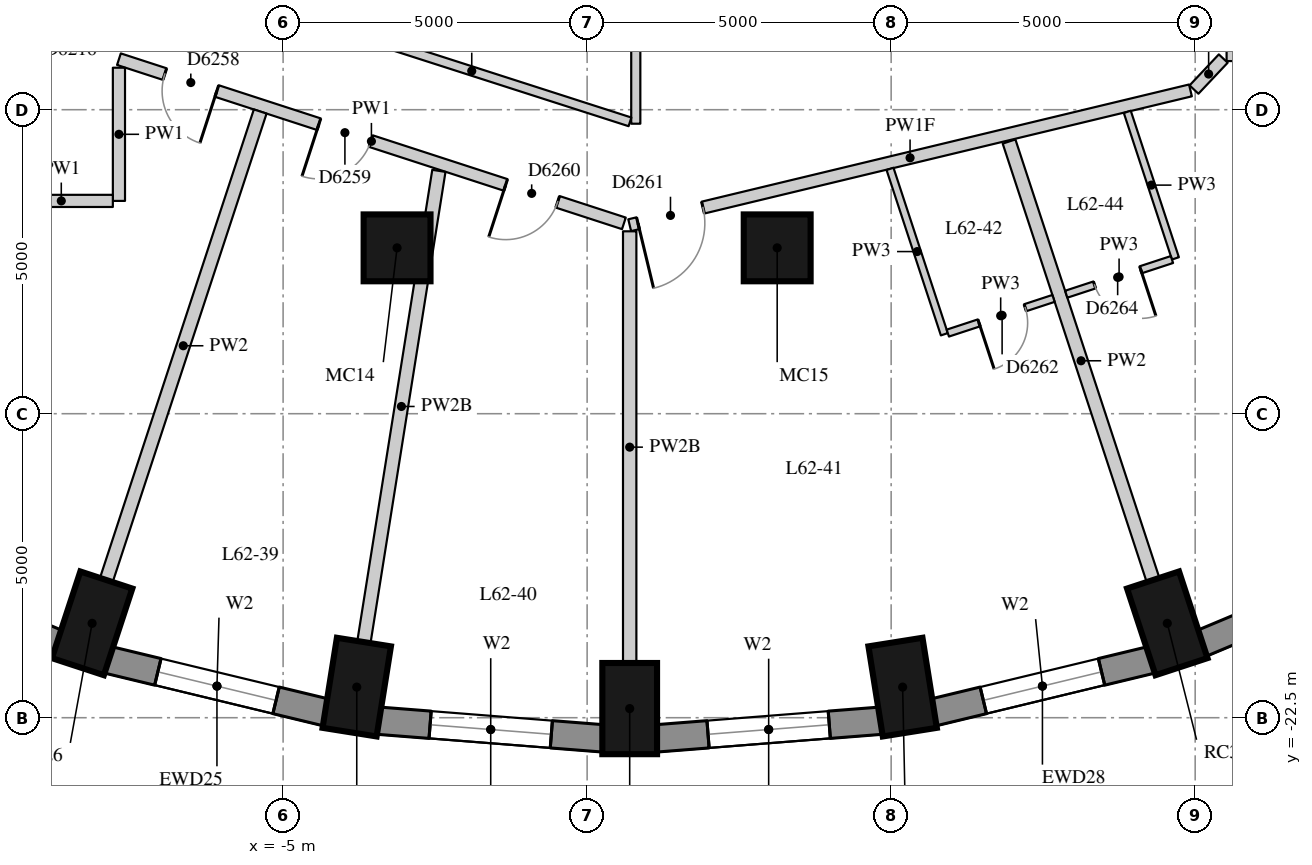
"""IFC4 building model, lengths in metres.
Left out: names, types, materials, properties, quantities, classifications, styles, units other than length and angle.
Written with IfcOpenShell. Run it as: python <this file> out.ifc"""

import sys

from ifc_helpers import new_model, si_unit, direction, frame, frame_2d, origin, origin_2d, place, context, subcontext, project, spatial, rectangle, extrude, element, fill, save


model = new_model("IFC4")
c1 = context("Model", 3, precision=1e-05, world=origin(), true_north=direction((0.0, 1.0)))
c2 = subcontext(c1, "Body", "Model", "MODEL_VIEW")
j1 = project(units=[si_unit("LENGTHUNIT", "METRE"), si_unit("PLANEANGLEUNIT", "RADIAN")], contexts=[c1])
p1 = place(None, origin())
s1 = spatial("IfcSite", under=j1, at=p1, CompositionType="ELEMENT")
p2 = place(p1, origin())
s2 = spatial("IfcBuilding", under=s1, at=p2, CompositionType="ELEMENT")
p3 = place(p2, frame((0.0, 0.0, 218.9)))
s3 = spatial("IfcBuildingStorey", under=s2, at=p3, CompositionType="ELEMENT", Elevation=218.9)
for number, where, z_axis, x_axis in (
    (1, (-8.141, -20.948, 0.0), (0.0, 0.0, 1.0), (-0.312, -0.95, 0.0)),
    (2, (-3.789, -21.997, 0.0), (0.0, 0.0, 1.0), (-0.157, -0.988, 0.0)),
    (3, (0.7, -22.35, 0.0), (0.0, 0.0, 1.0), (0.0, -1.0, 0.0)),
    (4, (5.189, -21.997, 0.0), (0.0, 0.0, 1.0), (0.157, -0.988, 0.0)),
    (5, (9.541, -20.948, 0.0), (0.0, 0.0, 1.0), (0.312, -0.95, 0.0)),
):
    element("IfcColumn", number, at=place(p3, frame(where, z_axis=z_axis, x_axis=x_axis)), inside=s3, PredefinedType="COLUMN", context=c2, shape_type="SweptSolid", body=[
        extrude(rectangle(XDim=1.5, YDim=0.9, at=origin_2d()), origin(), (0.0, 0.0, 1.0), 3.3),
    ])
for number, where, z_axis, x_axis in (
    (6, (-3.126, -14.772, 0.0), (0.0, 0.0, 1.0), (1.0, 0.0, 0.0)),
    (7, (3.126, -14.772, 0.0), (0.0, 0.0, 1.0), (1.0, 0.0, 0.0)),
):
    element("IfcColumn", number, at=place(p3, frame(where, z_axis=z_axis, x_axis=x_axis)), inside=s3, PredefinedType="COLUMN", context=c2, shape_type="SweptSolid", body=[
        extrude(rectangle(XDim=1.1, YDim=1.1, at=origin_2d()), origin(), (0.0, 0.0, 1.0), 3.3),
    ])
p4 = place(p3, frame((-12.069, -19.867, 0.0), z_axis=(0.0, 0.0, 1.0), x_axis=(0.922168222612, -0.386789050006, 0.0)))
e8 = element("IfcWall", 8, at=p4, inside=s3, PredefinedType="SOLIDWALL", context=c2, shape_type="SweptSolid", body=[
    extrude(rectangle(XDim=3.651, YDim=0.45, at=frame_2d((1.825, 0.0))), origin(), (0.0, 0.0, 1.0), 3.02),
])
p5 = place(p4, frame((0.825, 0.0, 0.4)))
e9 = element("IfcOpeningElement", 9, at=p5, cuts=e8, PredefinedType="OPENING", context=c2, shape_type="SweptSolid", body=[
    extrude(rectangle(XDim=2.0, YDim=1.75, at=frame_2d((1.0, 0.875))), frame((0.0, 0.235, 0.0), z_axis=(0.0, -1.0, 0.0), x_axis=(1.0, 0.0, 0.0)), (0.0, 0.0, 1.0), 0.47),
])
p6 = place(p3, frame((-7.885, -21.547, 0.0), z_axis=(0.0, 0.0, 1.0), x_axis=(0.9721584944, -0.234324266275, 0.0)))
e10 = element("IfcWall", 10, at=p6, inside=s3, PredefinedType="SOLIDWALL", context=c2, shape_type="SweptSolid", body=[
    extrude(rectangle(XDim=3.698, YDim=0.45, at=frame_2d((1.849, 0.0))), origin(), (0.0, 0.0, 1.0), 3.02),
])
p7 = place(p6, frame((0.849, 0.0, 0.4)))
e11 = element("IfcOpeningElement", 11, at=p7, cuts=e10, PredefinedType="OPENING", context=c2, shape_type="SweptSolid", body=[
    extrude(rectangle(XDim=2.0, YDim=1.75, at=frame_2d((1.0, 0.875))), frame((0.0, 0.235, 0.0), z_axis=(0.0, -1.0, 0.0), x_axis=(1.0, 0.0, 0.0)), (0.0, 0.0, 1.0), 0.47),
])
p8 = place(p3, frame((-3.441, -22.548, 0.0), z_axis=(0.0, 0.0, 1.0), x_axis=(0.996913971077, -0.078501810629, 0.0)))
e12 = element("IfcWall", 12, at=p8, inside=s3, PredefinedType="SOLIDWALL", context=c2, shape_type="SweptSolid", body=[
    extrude(rectangle(XDim=3.723, YDim=0.45, at=frame_2d((1.861, 0.0))), origin(), (0.0, 0.0, 1.0), 3.02),
])
p9 = place(p8, frame((0.861, 0.0, 0.4)))
e13 = element("IfcOpeningElement", 13, at=p9, cuts=e12, PredefinedType="OPENING", context=c2, shape_type="SweptSolid", body=[
    extrude(rectangle(XDim=2.0, YDim=1.75, at=frame_2d((1.0, 0.875))), frame((0.0, 0.235, 0.0), z_axis=(0.0, -1.0, 0.0), x_axis=(1.0, 0.0, 0.0)), (0.0, 0.0, 1.0), 0.47),
])
p10 = place(p3, frame((1.13, -22.841, 0.0), z_axis=(0.0, 0.0, 1.0), x_axis=(0.996913566885, 0.078506943392, 0.0)))
e14 = element("IfcWall", 14, at=p10, inside=s3, PredefinedType="SOLIDWALL", context=c2, shape_type="SweptSolid", body=[
    extrude(rectangle(XDim=3.722, YDim=0.45, at=frame_2d((1.861, 0.0))), origin(), (0.0, 0.0, 1.0), 3.02),
])
p11 = place(p10, frame((0.861, 0.0, 0.4)))
e15 = element("IfcOpeningElement", 15, at=p11, cuts=e14, PredefinedType="OPENING", context=c2, shape_type="SweptSolid", body=[
    extrude(rectangle(XDim=2.0, YDim=1.75, at=frame_2d((1.0, 0.875))), frame((0.0, 0.235, 0.0), z_axis=(0.0, -1.0, 0.0), x_axis=(1.0, 0.0, 0.0)), (0.0, 0.0, 1.0), 0.47),
])
p12 = place(p3, frame((5.691, -22.414, 0.0), z_axis=(0.0, 0.0, 1.0), x_axis=(0.9721584944, 0.234324266275, 0.0)))
e16 = element("IfcWall", 16, at=p12, inside=s3, PredefinedType="SOLIDWALL", context=c2, shape_type="SweptSolid", body=[
    extrude(rectangle(XDim=3.698, YDim=0.45, at=frame_2d((1.849, 0.0))), origin(), (0.0, 0.0, 1.0), 3.02),
])
p13 = place(p12, frame((0.849, 0.0, 0.4)))
e17 = element("IfcOpeningElement", 17, at=p13, cuts=e16, PredefinedType="OPENING", context=c2, shape_type="SweptSolid", body=[
    extrude(rectangle(XDim=2.0, YDim=1.75, at=frame_2d((1.0, 0.875))), frame((0.0, 0.235, 0.0), z_axis=(0.0, -1.0, 0.0), x_axis=(1.0, 0.0, 0.0)), (0.0, 0.0, 1.0), 0.47),
])
p14 = place(p3, frame((10.103, -21.279, 0.0), z_axis=(0.0, 0.0, 1.0), x_axis=(0.922168222612, 0.386789050006, 0.0)))
e18 = element("IfcWall", 18, at=p14, inside=s3, PredefinedType="SOLIDWALL", context=c2, shape_type="SweptSolid", body=[
    extrude(rectangle(XDim=3.651, YDim=0.45, at=frame_2d((1.825, 0.0))), origin(), (0.0, 0.0, 1.0), 3.02),
])
p15 = place(p14, frame((0.825, 0.0, 0.4)))
e19 = element("IfcOpeningElement", 19, at=p15, cuts=e18, PredefinedType="OPENING", context=c2, shape_type="SweptSolid", body=[
    extrude(rectangle(XDim=2.0, YDim=1.75, at=frame_2d((1.0, 0.875))), frame((0.0, 0.235, 0.0), z_axis=(0.0, -1.0, 0.0), x_axis=(1.0, 0.0, 0.0)), (0.0, 0.0, 1.0), 0.47),
])
p16 = place(p3, frame((17.5, -11.6, 0.0), z_axis=(0.0, 0.0, 1.0), x_axis=(-1.0, 0.0, 0.0)))
e20 = element("IfcWall", 20, at=p16, inside=s3, PredefinedType="PARTITIONING", context=c2, shape_type="SweptSolid", body=[
    extrude(rectangle(XDim=6.983, YDim=0.2, at=frame_2d((3.492, 0.0))), origin(), (0.0, 0.0, 1.0), 3.02),
])
p17 = place(p16, frame((5.743, 0.0, 0.0)))
e21 = element("IfcOpeningElement", 21, at=p17, cuts=e20, PredefinedType="OPENING", context=c2, shape_type="SweptSolid", body=[
    extrude(rectangle(XDim=1.1, YDim=2.1, at=frame_2d((0.55, 1.05))), frame((0.0, 0.11, 0.0), z_axis=(0.0, -1.0, 0.0), x_axis=(1.0, 0.0, 0.0)), (0.0, 0.0, 1.0), 0.22),
])
p18 = place(p16, frame((1.208, 0.0, 0.0)))
e22 = element("IfcOpeningElement", 22, at=p18, cuts=e20, PredefinedType="OPENING", context=c2, shape_type="SweptSolid", body=[
    extrude(rectangle(XDim=1.8, YDim=2.1, at=frame_2d((0.9, 1.05))), frame((0.0, 0.11, 0.0), z_axis=(0.0, -1.0, 0.0), x_axis=(1.0, 0.0, 0.0)), (0.0, 0.0, 1.0), 0.22),
])
p19 = place(p3, frame((10.462, -11.659, 0.0), z_axis=(0.0, 0.0, 1.0), x_axis=(-0.686265612426, -0.727351021998, 0.0)))
e23 = element("IfcWall", 23, at=p19, inside=s3, PredefinedType="PARTITIONING", context=c2, shape_type="SweptSolid", body=[
    extrude(rectangle(XDim=0.701, YDim=0.2, at=frame_2d((0.351, 0.0))), origin(), (0.0, 0.0, 1.0), 3.02),
])
p20 = place(p3, frame((9.922, -12.183, 0.0), z_axis=(0.0, 0.0, 1.0), x_axis=(-0.972292362394, -0.233768180104, 0.0)))
e24 = element("IfcWall", 24, at=p20, inside=s3, PredefinedType="PARTITIONING", context=c2, shape_type="SweptSolid", body=[
    extrude(rectangle(XDim=9.485, YDim=0.2, at=frame_2d((4.742, 0.0))), origin(), (0.0, 0.0, 1.0), 2.42),
])
p21 = place(p20, frame((8.245, 0.0, 0.0)))
e25 = element("IfcOpeningElement", 25, at=p21, cuts=e24, PredefinedType="OPENING", context=c2, shape_type="SweptSolid", body=[
    extrude(rectangle(XDim=1.1, YDim=2.1, at=frame_2d((0.55, 1.05))), frame((0.0, 0.11, 0.0), z_axis=(0.0, -1.0, 0.0), x_axis=(1.0, 0.0, 0.0)), (0.0, 0.0, 1.0), 0.22),
])
p22 = place(p3, frame((0.605, -14.369, 0.0), z_axis=(0.0, 0.0, 1.0), x_axis=(-0.950994614205, 0.309207444529, 0.0)))
e26 = element("IfcWall", 26, at=p22, inside=s3, PredefinedType="PARTITIONING", context=c2, shape_type="SweptSolid", body=[
    extrude(rectangle(XDim=8.733, YDim=0.2, at=frame_2d((4.366, 0.0))), origin(), (0.0, 0.0, 1.0), 3.02),
])
p23 = place(p22, frame((7.04, 0.0, 0.0)))
e27 = element("IfcOpeningElement", 27, at=p23, cuts=e26, PredefinedType="OPENING", context=c2, shape_type="SweptSolid", body=[
    extrude(rectangle(XDim=0.9, YDim=2.1, at=frame_2d((0.45, 1.05))), frame((0.0, 0.11, 0.0), z_axis=(0.0, -1.0, 0.0), x_axis=(1.0, 0.0, 0.0)), (0.0, 0.0, 1.0), 0.22),
])
p24 = place(p22, frame((4.375, 0.0, 0.0)))
e28 = element("IfcOpeningElement", 28, at=p24, cuts=e26, PredefinedType="OPENING", context=c2, shape_type="SweptSolid", body=[
    extrude(rectangle(XDim=0.9, YDim=2.1, at=frame_2d((0.45, 1.05))), frame((0.0, 0.11, 0.0), z_axis=(0.0, -1.0, 0.0), x_axis=(1.0, 0.0, 0.0)), (0.0, 0.0, 1.0), 0.22),
])
p25 = place(p22, frame((1.145, 0.0, 0.0)))
e29 = element("IfcOpeningElement", 29, at=p25, cuts=e26, PredefinedType="OPENING", context=c2, shape_type="SweptSolid", body=[
    extrude(rectangle(XDim=0.9, YDim=2.1, at=frame_2d((0.45, 1.05))), frame((0.0, 0.11, 0.0), z_axis=(0.0, -1.0, 0.0), x_axis=(1.0, 0.0, 0.0)), (0.0, 0.0, 1.0), 0.22),
])
p26 = place(p3, frame((-7.7, -11.809, 0.0), z_axis=(0.0, 0.0, 1.0), x_axis=(0.0, -1.0, 0.0)))
e30 = element("IfcWall", 30, at=p26, inside=s3, PredefinedType="PARTITIONING", context=c2, shape_type="SweptSolid", body=[
    extrude(rectangle(XDim=2.191, YDim=0.2, at=frame_2d((1.095, 0.0))), origin(), (0.0, 0.0, 1.0), 3.02),
])
p27 = place(p3, frame((-7.8, -14.0, 0.0), z_axis=(0.0, 0.0, 1.0), x_axis=(-1.0, 0.0, 0.0)))
e31 = element("IfcWall", 31, at=p27, inside=s3, PredefinedType="PARTITIONING", context=c2, shape_type="SweptSolid", body=[
    extrude(rectangle(XDim=1.696, YDim=0.2, at=frame_2d((0.848, 0.0))), origin(), (0.0, 0.0, 1.0), 3.02),
])
p28 = place(p3, frame((0.8, -9.23, 0.0), z_axis=(0.0, 0.0, 1.0), x_axis=(0.0, -1.0, 0.0)))
e32 = element("IfcWall", 32, at=p28, inside=s3, PredefinedType="PARTITIONING", context=c2, shape_type="SweptSolid", body=[
    extrude(rectangle(XDim=3.5, YDim=0.15, at=frame_2d((1.75, 0.0))), origin(), (0.0, 0.0, 1.0), 3.02),
])
p29 = place(p3, frame((0.705, -12.7, 0.0), z_axis=(0.0, 0.0, 1.0), x_axis=(-0.952035530576, 0.305987497327, 0.0)))
e33 = element("IfcWall", 33, at=p29, inside=s3, PredefinedType="PARTITIONING", context=c2, shape_type="SweptSolid", body=[
    extrude(rectangle(XDim=5.467, YDim=0.15, at=frame_2d((2.733, 0.0))), origin(), (0.0, 0.0, 1.0), 3.02),
])
p30 = place(p3, frame((-7.907, -20.235, 0.0), z_axis=(0.0, 0.0, 1.0), x_axis=(0.311998426629, 0.950082618397, 0.0)))
e34 = element("IfcWall", 34, at=p30, inside=s3, PredefinedType="PARTITIONING", context=c2, shape_type="SweptSolid", body=[
    extrude(rectangle(XDim=8.111, YDim=0.22, at=frame_2d((4.055, 0.0))), origin(), (0.0, 0.0, 1.0), 3.02),
])
p31 = place(p3, frame((-3.671, -21.256, 0.0), z_axis=(0.0, 0.0, 1.0), x_axis=(0.1571047049, 0.98758195189, 0.0)))
e35 = element("IfcWall", 35, at=p31, inside=s3, PredefinedType="PARTITIONING", context=c2, shape_type="SweptSolid", body=[
    extrude(rectangle(XDim=7.848, YDim=0.22, at=frame_2d((3.924, 0.0))), origin(), (0.0, 0.0, 1.0), 2.57),
])
p32 = place(p3, frame((0.7, -21.6, 0.0), z_axis=(0.0, 0.0, 1.0), x_axis=(0.0, 1.0, 0.0)))
e36 = element("IfcWall", 36, at=p32, inside=s3, PredefinedType="PARTITIONING", context=c2, shape_type="SweptSolid", body=[
    extrude(rectangle(XDim=7.1, YDim=0.22, at=frame_2d((3.55, 0.0))), origin(), (0.0, 0.0, 1.0), 2.57),
])
p33 = place(p3, frame((9.307, -20.235, 0.0), z_axis=(0.0, 0.0, 1.0), x_axis=(-0.311979110549, 0.950088961404, 0.0)))
e37 = element("IfcWall", 37, at=p33, inside=s3, PredefinedType="PARTITIONING", context=c2, shape_type="SweptSolid", body=[
    extrude(rectangle(XDim=7.591, YDim=0.22, at=frame_2d((3.795, 0.0))), origin(), (0.0, 0.0, 1.0), 3.02),
])
p34 = place(p3, frame((4.981, -13.473, 0.0), z_axis=(0.0, 0.0, 1.0), x_axis=(0.312029038347, -0.950072565243, 0.0)))
e38 = element("IfcWall", 38, at=p34, inside=s3, PredefinedType="PARTITIONING", context=c2, shape_type="SweptSolid", body=[
    extrude(rectangle(XDim=2.863, YDim=0.12, at=frame_2d((1.431, 0.0))), origin(), (0.0, 0.0, 1.0), 3.02),
])
p35 = place(p3, frame((8.884, -12.535, 0.0), z_axis=(0.0, 0.0, 1.0), x_axis=(0.312037873477, -0.950069663507, 0.0)))
e39 = element("IfcWall", 39, at=p35, inside=s3, PredefinedType="PARTITIONING", context=c2, shape_type="SweptSolid", body=[
    extrude(rectangle(XDim=2.537, YDim=0.12, at=frame_2d((1.268, 0.0))), origin(), (0.0, 0.0, 1.0), 3.02),
])
p36 = place(p3, frame((5.932, -16.174, 0.0), z_axis=(0.0, 0.0, 1.0), x_axis=(0.950140787885, 0.311821235962, 0.0)))
e40 = element("IfcWall", 40, at=p36, inside=s3, PredefinedType="PARTITIONING", context=c2, shape_type="SweptSolid", body=[
    extrude(rectangle(XDim=1.83, YDim=0.12, at=frame_2d((0.915, 0.0))), origin(), (0.0, 0.0, 1.0), 3.02),
])
p37 = place(p36, frame((0.54, 0.0, 0.0)))
e41 = element("IfcOpeningElement", 41, at=p37, cuts=e40, PredefinedType="OPENING", context=c2, shape_type="SweptSolid", body=[
    extrude(rectangle(XDim=0.8, YDim=2.1, at=frame_2d((0.4, 1.05))), frame((0.0, 0.07, 0.0), z_axis=(0.0, -1.0, 0.0), x_axis=(1.0, 0.0, 0.0)), (0.0, 0.0, 1.0), 0.14),
])
p38 = place(p3, frame((9.618, -14.964, 0.0), z_axis=(0.0, 0.0, 1.0), x_axis=(-0.950140787885, -0.311821235962, 0.0)))
e42 = element("IfcWall", 42, at=p38, inside=s3, PredefinedType="PARTITIONING", context=c2, shape_type="SweptSolid", body=[
    extrude(rectangle(XDim=1.83, YDim=0.12, at=frame_2d((0.915, 0.0))), origin(), (0.0, 0.0, 1.0), 3.02),
])
p39 = place(p38, frame((0.54, 0.0, 0.0)))
e43 = element("IfcOpeningElement", 43, at=p39, cuts=e42, PredefinedType="OPENING", context=c2, shape_type="SweptSolid", body=[
    extrude(rectangle(XDim=0.8, YDim=2.1, at=frame_2d((0.4, 1.05))), frame((0.0, 0.07, 0.0), z_axis=(0.0, -1.0, 0.0), x_axis=(1.0, 0.0, 0.0)), (0.0, 0.0, 1.0), 0.14),
])
p40 = place(p7, origin())
e44 = element("IfcWindow", 44, at=p40, inside=s3, PartitioningType="SINGLE_PANEL", PredefinedType="WINDOW", context=c2, shape_type="SweptSolid", body=[
    extrude(rectangle(XDim=2.0, YDim=1.75, at=frame_2d((1.0, 0.875))), frame((0.0, 0.035, 0.0), z_axis=(0.0, -1.0, 0.0), x_axis=(1.0, 0.0, 0.0)), (0.0, 0.0, 1.0), 0.06),
])
fill(e11, e44)
p41 = place(p9, origin())
e45 = element("IfcWindow", 45, at=p41, inside=s3, PartitioningType="SINGLE_PANEL", PredefinedType="WINDOW", context=c2, shape_type="SweptSolid", body=[
    extrude(rectangle(XDim=2.0, YDim=1.75, at=frame_2d((1.0, 0.875))), frame((0.0, 0.035, 0.0), z_axis=(0.0, -1.0, 0.0), x_axis=(1.0, 0.0, 0.0)), (0.0, 0.0, 1.0), 0.06),
])
fill(e13, e45)
p42 = place(p11, origin())
e46 = element("IfcWindow", 46, at=p42, inside=s3, PartitioningType="SINGLE_PANEL", PredefinedType="WINDOW", context=c2, shape_type="SweptSolid", body=[
    extrude(rectangle(XDim=2.0, YDim=1.75, at=frame_2d((1.0, 0.875))), frame((0.0, 0.035, 0.0), z_axis=(0.0, -1.0, 0.0), x_axis=(1.0, 0.0, 0.0)), (0.0, 0.0, 1.0), 0.06),
])
fill(e15, e46)
p43 = place(p13, origin())
e47 = element("IfcWindow", 47, at=p43, inside=s3, PartitioningType="SINGLE_PANEL", PredefinedType="WINDOW", context=c2, shape_type="SweptSolid", body=[
    extrude(rectangle(XDim=2.0, YDim=1.75, at=frame_2d((1.0, 0.875))), frame((0.0, 0.035, 0.0), z_axis=(0.0, -1.0, 0.0), x_axis=(1.0, 0.0, 0.0)), (0.0, 0.0, 1.0), 0.06),
])
fill(e17, e47)
p44 = place(p23, origin())
e48 = element("IfcDoor", 48, at=p44, inside=s3, OperationType="SINGLE_SWING_LEFT", PredefinedType="DOOR", context=c2, shape_type="SweptSolid", body=[
    extrude(rectangle(XDim=0.9, YDim=2.1, at=frame_2d((0.45, 1.05))), frame((0.0, 0.025, 0.0), z_axis=(0.0, -1.0, 0.0), x_axis=(1.0, 0.0, 0.0)), (0.0, 0.0, 1.0), 0.05),
])
fill(e27, e48)
p45 = place(p24, origin())
e49 = element("IfcDoor", 49, at=p45, inside=s3, OperationType="SINGLE_SWING_RIGHT", PredefinedType="DOOR", context=c2, shape_type="SweptSolid", body=[
    extrude(rectangle(XDim=0.9, YDim=2.1, at=frame_2d((0.45, 1.05))), frame((0.0, 0.025, 0.0), z_axis=(0.0, -1.0, 0.0), x_axis=(1.0, 0.0, 0.0)), (0.0, 0.0, 1.0), 0.05),
])
fill(e28, e49)
p46 = place(p25, origin())
e50 = element("IfcDoor", 50, at=p46, inside=s3, OperationType="SINGLE_SWING_RIGHT", PredefinedType="DOOR", context=c2, shape_type="SweptSolid", body=[
    extrude(rectangle(XDim=0.9, YDim=2.1, at=frame_2d((0.45, 1.05))), frame((0.0, 0.025, 0.0), z_axis=(0.0, -1.0, 0.0), x_axis=(1.0, 0.0, 0.0)), (0.0, 0.0, 1.0), 0.05),
])
fill(e29, e50)
p47 = place(p21, origin())
e51 = element("IfcDoor", 51, at=p47, inside=s3, OperationType="SINGLE_SWING_RIGHT", PredefinedType="DOOR", context=c2, shape_type="SweptSolid", body=[
    extrude(rectangle(XDim=1.1, YDim=2.1, at=frame_2d((0.55, 1.05))), frame((0.0, 0.025, 0.0), z_axis=(0.0, -1.0, 0.0), x_axis=(1.0, 0.0, 0.0)), (0.0, 0.0, 1.0), 0.05),
])
fill(e25, e51)
p48 = place(p37, origin())
e52 = element("IfcDoor", 52, at=p48, inside=s3, OperationType="SINGLE_SWING_RIGHT", PredefinedType="DOOR", context=c2, shape_type="SweptSolid", body=[
    extrude(rectangle(XDim=0.8, YDim=2.1, at=frame_2d((0.4, 1.05))), frame((0.0, 0.025, 0.0), z_axis=(0.0, -1.0, 0.0), x_axis=(1.0, 0.0, 0.0)), (0.0, 0.0, 1.0), 0.05),
])
fill(e41, e52)
p49 = place(p39, origin())
e53 = element("IfcDoor", 53, at=p49, inside=s3, OperationType="SINGLE_SWING_LEFT", PredefinedType="DOOR", context=c2, shape_type="SweptSolid", body=[
    extrude(rectangle(XDim=0.8, YDim=2.1, at=frame_2d((0.4, 1.05))), frame((0.0, 0.025, 0.0), z_axis=(0.0, -1.0, 0.0), x_axis=(1.0, 0.0, 0.0)), (0.0, 0.0, 1.0), 0.05),
])
fill(e43, e53)
save(model, sys.argv[1])
